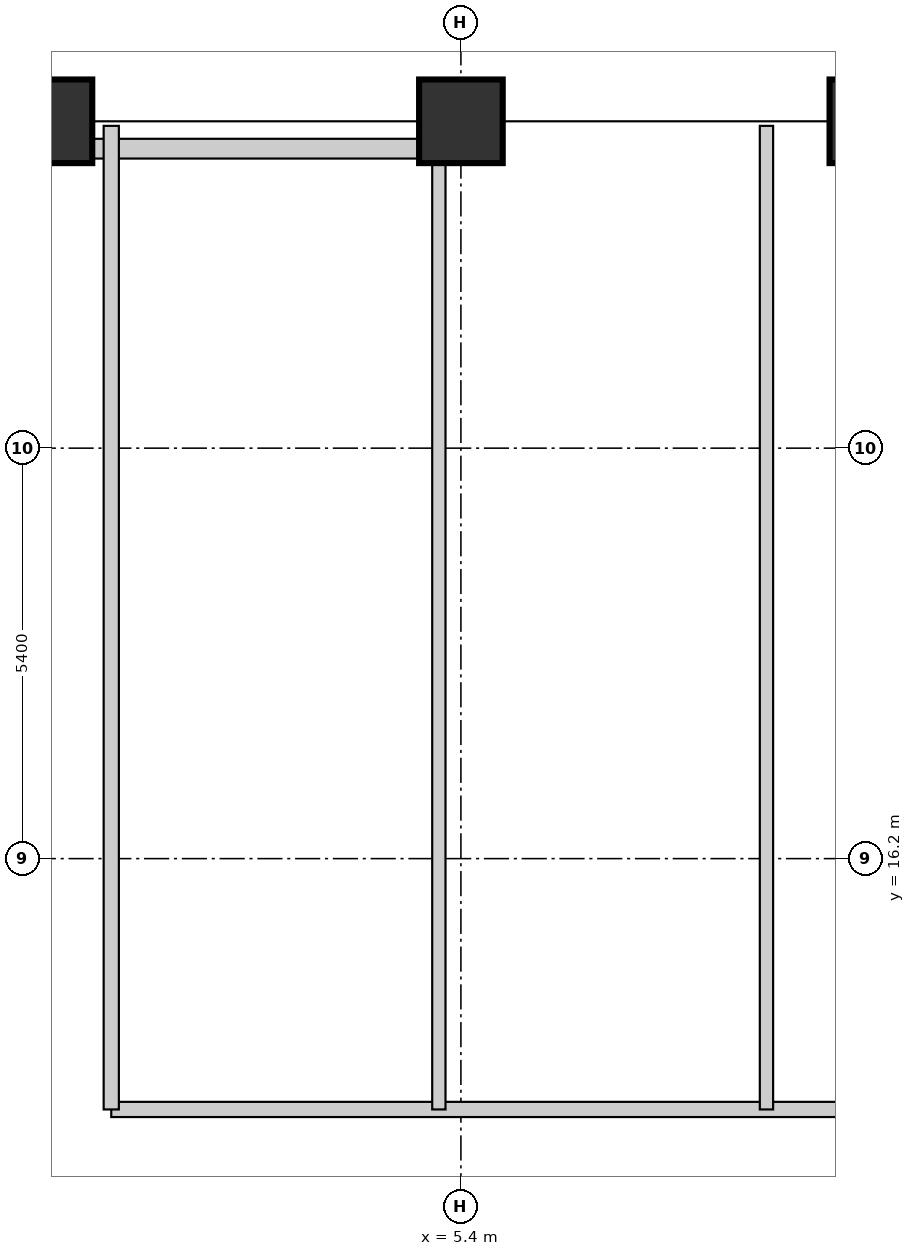
"""IFC4 building model, lengths in metres.
Left out: names, types, materials, properties, quantities, classifications, styles, units other than length and angle.
Written with IfcOpenShell. Run it as: python <this file> out.ifc"""

import sys

from ifc_helpers import new_model, si_unit, direction, frame, frame_2d, origin, origin_2d, place, context, subcontext, project, spatial, rectangle, extrude, element, fill, save


model = new_model("IFC4")
c1 = context("Model", 3, precision=1e-05, world=origin(), true_north=direction((0.0, 1.0)))
c2 = subcontext(c1, "Body", "Model", "MODEL_VIEW")
j1 = project(units=[si_unit("LENGTHUNIT", "METRE"), si_unit("PLANEANGLEUNIT", "RADIAN")], contexts=[c1])
p1 = place(None, origin())
s1 = spatial("IfcSite", under=j1, at=p1, CompositionType="ELEMENT")
p2 = place(p1, origin())
s2 = spatial("IfcBuilding", under=s1, at=p2, CompositionType="ELEMENT")
p3 = place(p2, frame((0.0, 0.0, 83.25)))
s3 = spatial("IfcBuildingStorey", under=s2, at=p3, CompositionType="ELEMENT", Elevation=83.25)
for number, where, z_axis, x_axis in (
    (1, (0.0, 25.9, 0.0), (0.0, 0.0, 1.0), (1.0, 0.0, 0.0)),
    (2, (5.4, 25.9, 0.0), (0.0, 0.0, 1.0), (1.0, 0.0, 0.0)),
    (3, (10.8, 25.9, 0.0), (0.0, 0.0, 1.0), (1.0, 0.0, 0.0)),
):
    element("IfcColumn", number, at=place(p3, frame(where, z_axis=z_axis, x_axis=x_axis)), inside=s3, PredefinedType="COLUMN", context=c2, shape_type="SweptSolid", body=[
        extrude(rectangle(XDim=1.1, YDim=1.1, at=origin_2d()), origin(), (0.0, 0.0, 1.0), 3.75),
    ])
p4 = place(p3, frame((4.852, 25.54, 0.0), z_axis=(0.0, 0.0, 1.0), x_axis=(-1.0, 0.0, 0.0)))
e4 = element("IfcWall", 4, at=p4, inside=s3, PredefinedType="STANDARD", context=c2, shape_type="SweptSolid", body=[
    extrude(rectangle(XDim=4.304, YDim=0.26, at=frame_2d((2.152, 0.0))), origin(), (0.0, 0.0, 1.0), 2.699),
])
p5 = place(p3, frame((0.8, 12.9, 0.0), z_axis=(0.0, 0.0, 1.0), x_axis=(1.0, 0.0, 0.0)))
e5 = element("IfcWall", 5, at=p5, inside=s3, PredefinedType="PARTITIONING", context=c2, shape_type="SweptSolid", body=[
    extrude(rectangle(XDim=12.68, YDim=0.2, at=frame_2d((6.34, 0.0))), origin(), (0.0, 0.0, 1.0), 2.933),
])
p6 = place(p5, frame((1.705, 0.0, 0.0)))
e6 = element("IfcOpeningElement", 6, at=p6, cuts=e5, PredefinedType="OPENING", context=c2, shape_type="SweptSolid", body=[
    extrude(rectangle(XDim=0.85, YDim=2.1, at=frame_2d((0.425, 1.05))), frame((0.0, 0.11, 0.0), z_axis=(0.0, -1.0, 0.0), x_axis=(1.0, 0.0, 0.0)), (0.0, 0.0, 1.0), 0.22),
])
p7 = place(p5, frame((6.015, 0.0, 0.0)))
e7 = element("IfcOpeningElement", 7, at=p7, cuts=e5, PredefinedType="OPENING", context=c2, shape_type="SweptSolid", body=[
    extrude(rectangle(XDim=0.85, YDim=2.1, at=frame_2d((0.425, 1.05))), frame((0.0, 0.11, 0.0), z_axis=(0.0, -1.0, 0.0), x_axis=(1.0, 0.0, 0.0)), (0.0, 0.0, 1.0), 0.22),
])
p8 = place(p5, frame((11.55, 0.0, 0.0)))
e8 = element("IfcOpeningElement", 8, at=p8, cuts=e5, PredefinedType="OPENING", context=c2, shape_type="SweptSolid", body=[
    extrude(rectangle(XDim=0.85, YDim=2.1, at=frame_2d((0.425, 1.05))), frame((0.0, 0.11, 0.0), z_axis=(0.0, -1.0, 0.0), x_axis=(1.0, 0.0, 0.0)), (0.0, 0.0, 1.0), 0.22),
])
p9 = place(p3, frame((0.8, 12.9, 0.0), z_axis=(0.0, 0.0, 1.0), x_axis=(0.0, 1.0, 0.0)))
e9 = element("IfcWall", 9, at=p9, inside=s3, PredefinedType="PARTITIONING", context=c2, shape_type="SweptSolid", body=[
    extrude(rectangle(XDim=12.94, YDim=0.2, at=frame_2d((6.47, 0.0))), origin(), (0.0, 0.0, 1.0), 2.699),
])
for number, where, z_axis, x_axis in (
    (10, (5.11, 12.9, 0.0), (0.0, 0.0, 1.0), (0.0, 1.0, 0.0)),
    (11, (9.42, 12.9, 0.0), (0.0, 0.0, 1.0), (0.0, 1.0, 0.0)),
):
    element("IfcWall", number, at=place(p3, frame(where, z_axis=z_axis, x_axis=x_axis)), inside=s3, PredefinedType="PARTITIONING", context=c2, shape_type="SweptSolid", body=[
        extrude(rectangle(XDim=12.94, YDim=0.175, at=frame_2d((6.47, 0.0))), origin(), (0.0, 0.0, 1.0), 2.699),
    ])
p10 = place(p6, origin())
e12 = element("IfcDoor", 12, at=p10, inside=s3, OperationType="SINGLE_SWING_LEFT", PredefinedType="DOOR", context=c2, shape_type="SweptSolid", body=[
    extrude(rectangle(XDim=0.85, YDim=2.1, at=frame_2d((0.425, 1.05))), frame((0.0, 0.025, 0.0), z_axis=(0.0, -1.0, 0.0), x_axis=(1.0, 0.0, 0.0)), (0.0, 0.0, 1.0), 0.05),
])
fill(e6, e12)
p11 = place(p7, origin())
e13 = element("IfcDoor", 13, at=p11, inside=s3, OperationType="SINGLE_SWING_RIGHT", PredefinedType="DOOR", context=c2, shape_type="SweptSolid", body=[
    extrude(rectangle(XDim=0.85, YDim=2.1, at=frame_2d((0.425, 1.05))), frame((0.0, 0.025, 0.0), z_axis=(0.0, -1.0, 0.0), x_axis=(1.0, 0.0, 0.0)), (0.0, 0.0, 1.0), 0.05),
])
fill(e7, e13)
save(model, sys.argv[1])
